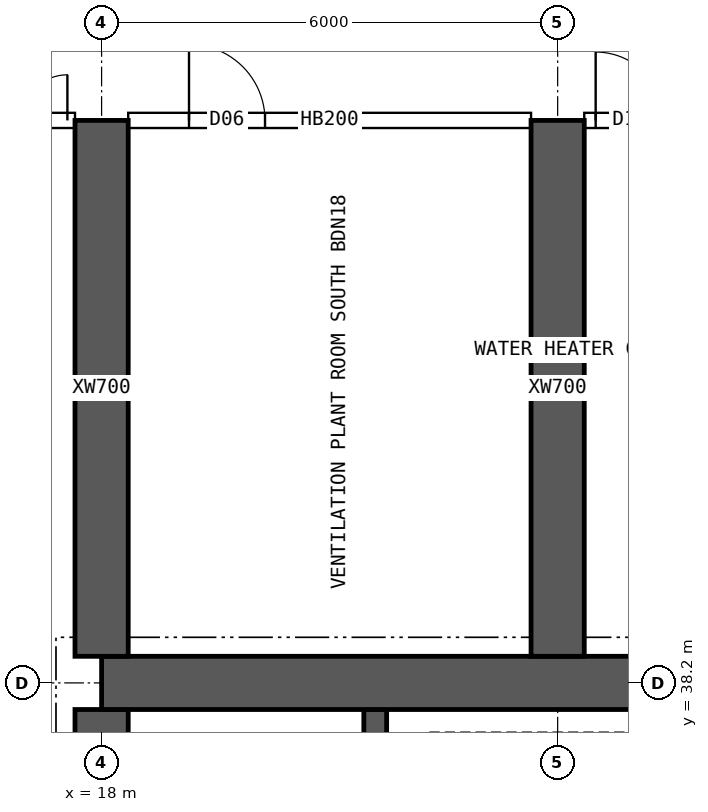
"""IFC4 building model, lengths in metres.
Left out: names, types, materials, properties, quantities, classifications, styles, units other than length and angle.
Written with IfcOpenShell. Run it as: python <this file> out.ifc"""

import sys

from ifc_helpers import new_model, si_unit, direction, frame, frame_2d, origin, place, context, subcontext, project, spatial, rectangle, extrude, element, fill, save


model = new_model("IFC4")
c1 = context("Model", 3, precision=1e-05, world=origin(), true_north=direction((0.0, 1.0)))
c2 = subcontext(c1, "Body", "Model", "MODEL_VIEW")
j1 = project(units=[si_unit("LENGTHUNIT", "METRE"), si_unit("PLANEANGLEUNIT", "RADIAN")], contexts=[c1])
p1 = place(None, origin())
s1 = spatial("IfcSite", under=j1, at=p1, CompositionType="ELEMENT")
p2 = place(p1, origin())
s2 = spatial("IfcBuilding", under=s1, at=p2, CompositionType="ELEMENT")
p3 = place(p2, frame((0.0, 0.0, 216.55)))
s3 = spatial("IfcBuildingStorey", under=s2, at=p3, CompositionType="ELEMENT", Elevation=216.55)
p4 = place(p3, frame((18.0, 38.2, 0.0), z_axis=(0.0, 0.0, 1.0), x_axis=(1.0, 0.0, 0.0)))
e1 = element("IfcWall", 1, at=p4, inside=s3, PredefinedType="SHEAR", context=c2, shape_type="SweptSolid", body=[
    extrude(rectangle(XDim=48.0, YDim=0.7, at=frame_2d((24.0, 0.0))), origin(), (0.0, 0.0, 1.0), 3.75),
])
p5 = place(p3, frame((18.0, 26.15, 0.0), z_axis=(0.0, 0.0, 1.0), x_axis=(0.0, 1.0, 0.0)))
e2 = element("IfcWall", 2, at=p5, inside=s3, PredefinedType="SHEAR", context=c2, shape_type="SweptSolid", body=[
    extrude(rectangle(XDim=11.7, YDim=0.7, at=frame_2d((5.85, 0.0))), origin(), (0.0, 0.0, 1.0), 3.75),
])
p6 = place(p5, frame((5.15, 0.0, 0.0)))
e3 = element("IfcOpeningElement", 3, at=p6, cuts=e2, PredefinedType="OPENING", context=c2, shape_type="SweptSolid", body=[
    extrude(rectangle(XDim=1.2, YDim=2.1, at=frame_2d((0.6, 1.05))), frame((0.0, 0.36, 0.0), z_axis=(0.0, -1.0, 0.0), x_axis=(1.0, 0.0, 0.0)), (0.0, 0.0, 1.0), 0.72),
])
p7 = place(p3, frame((21.6, 34.75, 0.0), z_axis=(0.0, 0.0, 1.0), x_axis=(0.0, 1.0, 0.0)))
e4 = element("IfcWall", 4, at=p7, inside=s3, PredefinedType="SHEAR", context=c2, shape_type="SweptSolid", body=[
    extrude(rectangle(XDim=3.1, YDim=0.3, at=frame_2d((1.55, 0.0))), origin(), (0.0, 0.0, 1.0), 3.75),
])
for number, where, z_axis, x_axis in (
    (5, (18.0, 38.55, 0.0), (0.0, 0.0, 1.0), (0.0, 1.0, 0.0)),
    (6, (24.0, 38.55, 0.0), (0.0, 0.0, 1.0), (0.0, 1.0, 0.0)),
):
    element("IfcWall", number, at=place(p3, frame(where, z_axis=z_axis, x_axis=x_axis)), inside=s3, PredefinedType="SHEAR", context=c2, shape_type="SweptSolid", body=[
        extrude(rectangle(XDim=7.05, YDim=0.7, at=frame_2d((3.525, 0.0))), origin(), (0.0, 0.0, 1.0), 3.75),
    ])
p8 = place(p3, frame((15.6, 45.6, 0.0), z_axis=(0.0, 0.0, 1.0), x_axis=(1.0, 0.0, 0.0)))
e7 = element("IfcWall", 7, at=p8, inside=s3, PredefinedType="SOLIDWALL", context=c2, shape_type="SweptSolid", body=[
    extrude(rectangle(XDim=2.05, YDim=0.2, at=frame_2d((1.025, 0.0))), origin(), (0.0, 0.0, 1.0), 3.5),
])
p9 = place(p8, frame((0.75, 0.0, 0.0)))
e8 = element("IfcOpeningElement", 8, at=p9, cuts=e7, PredefinedType="OPENING", context=c2, shape_type="SweptSolid", body=[
    extrude(rectangle(XDim=1.2, YDim=2.1, at=frame_2d((0.6, 1.05))), frame((0.0, 0.11, 0.0), z_axis=(0.0, -1.0, 0.0), x_axis=(1.0, 0.0, 0.0)), (0.0, 0.0, 1.0), 0.22),
])
p10 = place(p3, frame((18.35, 45.6, 0.0), z_axis=(0.0, 0.0, 1.0), x_axis=(1.0, 0.0, 0.0)))
e9 = element("IfcWall", 9, at=p10, inside=s3, PredefinedType="SOLIDWALL", context=c2, shape_type="SweptSolid", body=[
    extrude(rectangle(XDim=5.3, YDim=0.2, at=frame_2d((2.65, 0.0))), origin(), (0.0, 0.0, 1.0), 3.5),
])
p11 = place(p10, frame((0.8, 0.0, 0.0)))
e10 = element("IfcOpeningElement", 10, at=p11, cuts=e9, PredefinedType="OPENING", context=c2, shape_type="SweptSolid", body=[
    extrude(rectangle(XDim=1.0, YDim=2.1, at=frame_2d((0.5, 1.05))), frame((0.0, 0.11, 0.0), z_axis=(0.0, -1.0, 0.0), x_axis=(1.0, 0.0, 0.0)), (0.0, 0.0, 1.0), 0.22),
])
p12 = place(p3, frame((24.35, 45.6, 0.0), z_axis=(0.0, 0.0, 1.0), x_axis=(1.0, 0.0, 0.0)))
e11 = element("IfcWall", 11, at=p12, inside=s3, PredefinedType="SOLIDWALL", context=c2, shape_type="SweptSolid", body=[
    extrude(rectangle(XDim=5.3, YDim=0.2, at=frame_2d((2.65, 0.0))), origin(), (0.0, 0.0, 1.0), 3.5),
])
p13 = place(p12, frame((0.15, 0.0, 0.0)))
e12 = element("IfcOpeningElement", 12, at=p13, cuts=e11, PredefinedType="OPENING", context=c2, shape_type="SweptSolid", body=[
    extrude(rectangle(XDim=0.9, YDim=2.1, at=frame_2d((0.45, 1.05))), frame((0.0, 0.11, 0.0), z_axis=(0.0, -1.0, 0.0), x_axis=(1.0, 0.0, 0.0)), (0.0, 0.0, 1.0), 0.22),
])
p14 = place(p12, frame((2.16, 0.0, 0.0)))
e13 = element("IfcOpeningElement", 13, at=p14, cuts=e11, PredefinedType="OPENING", context=c2, shape_type="SweptSolid", body=[
    extrude(rectangle(XDim=0.9, YDim=2.1, at=frame_2d((0.45, 1.05))), frame((0.0, 0.11, 0.0), z_axis=(0.0, -1.0, 0.0), x_axis=(1.0, 0.0, 0.0)), (0.0, 0.0, 1.0), 0.22),
])
p15 = place(p9, origin())
e14 = element("IfcDoor", 14, at=p15, inside=s3, OperationType="DOUBLE_DOOR_SINGLE_SWING", PredefinedType="DOOR", context=c2, shape_type="SweptSolid", body=[
    extrude(rectangle(XDim=1.2, YDim=2.1, at=frame_2d((0.6, 1.05))), frame((0.0, 0.025, 0.0), z_axis=(0.0, -1.0, 0.0), x_axis=(1.0, 0.0, 0.0)), (0.0, 0.0, 1.0), 0.05),
])
fill(e8, e14)
p16 = place(p11, origin())
e15 = element("IfcDoor", 15, at=p16, inside=s3, OperationType="SINGLE_SWING_LEFT", PredefinedType="DOOR", context=c2, shape_type="SweptSolid", body=[
    extrude(rectangle(XDim=1.0, YDim=2.1, at=frame_2d((0.5, 1.05))), frame((0.0, 0.025, 0.0), z_axis=(0.0, -1.0, 0.0), x_axis=(1.0, 0.0, 0.0)), (0.0, 0.0, 1.0), 0.05),
])
fill(e10, e15)
p17 = place(p13, origin())
e16 = element("IfcDoor", 16, at=p17, inside=s3, OperationType="SINGLE_SWING_LEFT", PredefinedType="DOOR", context=c2, shape_type="SweptSolid", body=[
    extrude(rectangle(XDim=0.9, YDim=2.1, at=frame_2d((0.45, 1.05))), frame((0.0, 0.025, 0.0), z_axis=(0.0, -1.0, 0.0), x_axis=(1.0, 0.0, 0.0)), (0.0, 0.0, 1.0), 0.05),
])
fill(e12, e16)
save(model, sys.argv[1])
